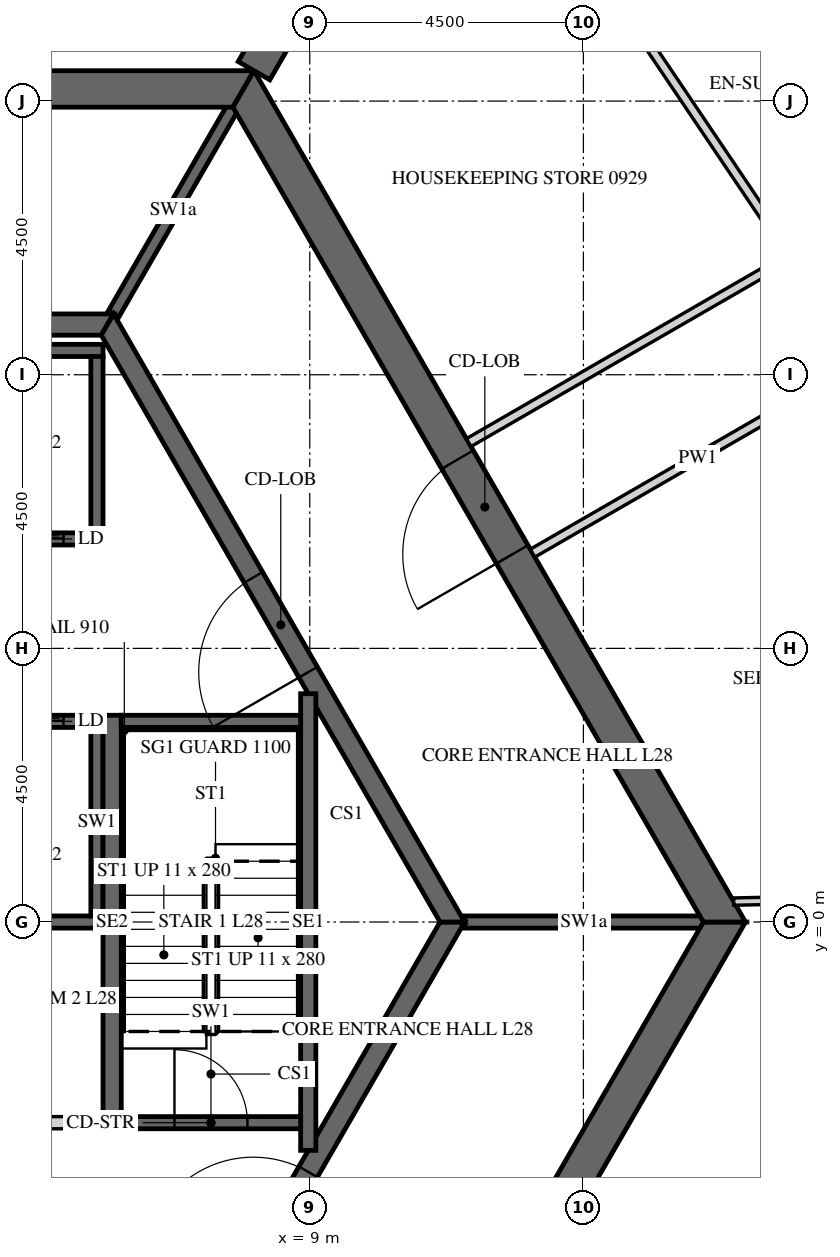
"""IFC4 building model, lengths in metres.
Left out: names, types, materials, properties, quantities, classifications, styles, units other than length and angle.
Written with IfcOpenShell. Run it as: python <this file> out.ifc"""

import sys

from ifc_helpers import new_model, si_unit, direction, frame, frame_2d, origin, place, context, subcontext, project, spatial, polyline, rectangle, outline, extrude, element, fill, save


model = new_model("IFC4")
c1 = context("Model", 3, precision=1e-05, world=origin(), true_north=direction((0.0, 1.0)))
c2 = subcontext(c1, "Body", "Model", "MODEL_VIEW")
j1 = project(units=[si_unit("LENGTHUNIT", "METRE"), si_unit("PLANEANGLEUNIT", "RADIAN")], contexts=[c1])
p1 = place(None, origin())
s1 = spatial("IfcSite", under=j1, at=p1, CompositionType="ELEMENT")
p2 = place(p1, origin())
s2 = spatial("IfcBuilding", under=s1, at=p2, CompositionType="ELEMENT")
p3 = place(p2, frame((0.0, 0.0, 123.3)))
s3 = spatial("IfcBuildingStorey", under=s2, at=p3, CompositionType="ELEMENT", Elevation=123.3)
p4 = place(p3, frame((7.91, -13.7, -0.15), z_axis=(0.0, 0.0, 1.0), x_axis=(0.499999880136, 0.866025472988, 0.0)))
e1 = element("IfcWall", 1, at=p4, inside=s3, PredefinedType="SHEAR", context=c2, shape_type="SweptSolid", body=[
    extrude(outline(polyline([(-0.173, -0.3), (15.993, -0.3), (15.646, 0.3), (0.173, 0.3), (-0.173, -0.3)])), origin(), (0.0, 0.0, 1.0), 3.9),
])
p5 = place(p4, frame((7.039, 0.0, 0.15)))
e2 = element("IfcOpeningElement", 2, at=p5, cuts=e1, PredefinedType="OPENING", context=c2, shape_type="SweptSolid", body=[
    extrude(rectangle(XDim=1.8, YDim=2.4, at=frame_2d((0.9, 1.2))), frame((0.0, 0.31, 0.0), z_axis=(0.0, -1.0, 0.0), x_axis=(1.0, 0.0, 0.0)), (0.0, 0.0, 1.0), 0.62),
])
p6 = place(p3, frame((15.819, 0.0, -0.15), z_axis=(0.0, 0.0, 1.0), x_axis=(-0.499999880136, 0.866025472988, 0.0)))
e3 = element("IfcWall", 3, at=p6, inside=s3, PredefinedType="SHEAR", context=c2, shape_type="SweptSolid", body=[
    extrude(outline(polyline([(-0.173, -0.3), (15.993, -0.3), (15.646, 0.3), (0.173, 0.3), (-0.173, -0.3)])), origin(), (0.0, 0.0, 1.0), 3.9),
])
p7 = place(p6, frame((6.981, 0.0, 0.15)))
e4 = element("IfcOpeningElement", 4, at=p7, cuts=e3, PredefinedType="OPENING", context=c2, shape_type="SweptSolid", body=[
    extrude(rectangle(XDim=1.8, YDim=2.4, at=frame_2d((0.9, 1.2))), frame((0.0, 0.31, 0.0), z_axis=(0.0, -1.0, 0.0), x_axis=(1.0, 0.0, 0.0)), (0.0, 0.0, 1.0), 0.62),
])
p8 = place(p3, frame((7.91, 13.7, -0.15), z_axis=(0.0, 0.0, 1.0), x_axis=(-1.0, 0.0, 0.0)))
e5 = element("IfcWall", 5, at=p8, inside=s3, PredefinedType="SHEAR", context=c2, shape_type="SweptSolid", body=[
    extrude(outline(polyline([(-0.173, -0.3), (15.993, -0.3), (15.646, 0.3), (0.173, 0.3), (-0.173, -0.3)])), origin(), (0.0, 0.0, 1.0), 3.9),
])
p9 = place(p8, frame((7.31, 0.0, 0.15)))
e6 = element("IfcOpeningElement", 6, at=p9, cuts=e5, PredefinedType="OPENING", context=c2, shape_type="SweptSolid", body=[
    extrude(rectangle(XDim=1.2, YDim=2.4, at=frame_2d((0.6, 1.2))), frame((0.0, 0.31, 0.0), z_axis=(0.0, -1.0, 0.0), x_axis=(1.0, 0.0, 0.0)), (0.0, 0.0, 1.0), 0.62),
])
p10 = place(p3, frame((8.083, 14.0, -0.15), z_axis=(0.0, 0.0, 1.0), x_axis=(0.499997680643, 0.866026742862, 0.0)))
e7 = element("IfcWall", 7, at=p10, inside=s3, PredefinedType="SHEAR", context=c2, shape_type="SweptSolid", body=[
    extrude(rectangle(XDim=16.509, YDim=0.6, at=frame_2d((8.254, 0.0))), origin(), (0.0, 0.0, 1.0), 3.9),
])
p11 = place(p10, frame((7.354, 0.0, 0.15)))
e8 = element("IfcOpeningElement", 8, at=p11, cuts=e7, PredefinedType="OPENING", context=c2, shape_type="SweptSolid", body=[
    extrude(rectangle(XDim=1.8, YDim=2.4, at=frame_2d((0.9, 1.2))), frame((0.0, 0.31, 0.0), z_axis=(0.0, -1.0, 0.0), x_axis=(1.0, 0.0, 0.0)), (0.0, 0.0, 1.0), 0.62),
])
p12 = place(p3, frame((5.673, -9.825, -0.15), z_axis=(0.0, 0.0, 1.0), x_axis=(0.499995046907, 0.866028263435, 0.0)))
e9 = element("IfcWall", 9, at=p12, inside=s3, PredefinedType="SHEAR", context=c2, shape_type="SweptSolid", body=[
    extrude(outline(polyline([(-0.101, -0.175), (11.446, -0.175), (11.244, 0.175), (0.101, 0.175), (-0.101, -0.175)])), origin(), (0.0, 0.0, 1.0), 3.9),
])
p13 = place(p12, frame((4.801, 0.0, 0.15)))
e10 = element("IfcOpeningElement", 10, at=p13, cuts=e9, PredefinedType="OPENING", context=c2, shape_type="SweptSolid", body=[
    extrude(rectangle(XDim=1.8, YDim=2.4, at=frame_2d((0.9, 1.2))), frame((0.0, 0.185, 0.0), z_axis=(0.0, -1.0, 0.0), x_axis=(1.0, 0.0, 0.0)), (0.0, 0.0, 1.0), 0.37),
])
p14 = place(p3, frame((11.345, 0.0, -0.15), z_axis=(0.0, 0.0, 1.0), x_axis=(-0.499995046907, 0.866028263435, 0.0)))
e11 = element("IfcWall", 11, at=p14, inside=s3, PredefinedType="SHEAR", context=c2, shape_type="SweptSolid", body=[
    extrude(outline(polyline([(-0.101, -0.175), (11.446, -0.175), (11.244, 0.175), (0.101, 0.175), (-0.101, -0.175)])), origin(), (0.0, 0.0, 1.0), 3.9),
])
p15 = place(p14, frame((4.744, 0.0, 0.15)))
e12 = element("IfcOpeningElement", 12, at=p15, cuts=e11, PredefinedType="OPENING", context=c2, shape_type="SweptSolid", body=[
    extrude(rectangle(XDim=1.8, YDim=2.4, at=frame_2d((0.9, 1.2))), frame((0.0, 0.185, 0.0), z_axis=(0.0, -1.0, 0.0), x_axis=(1.0, 0.0, 0.0)), (0.0, 0.0, 1.0), 0.37),
])
p16 = place(p3, frame((5.673, 9.825, -0.15), z_axis=(0.0, 0.0, 1.0), x_axis=(-1.0, 0.0, 0.0)))
e13 = element("IfcWall", 13, at=p16, inside=s3, PredefinedType="SHEAR", context=c2, shape_type="SweptSolid", body=[
    extrude(outline(polyline([(-0.101, -0.175), (11.446, -0.175), (11.244, 0.175), (0.101, 0.175), (-0.101, -0.175)])), origin(), (0.0, 0.0, 1.0), 3.9),
])
p17 = place(p3, frame((-5.6, 6.3, -0.25), z_axis=(0.0, 0.0, 1.0), x_axis=(1.0, 0.0, 0.0)))
e14 = element("IfcWall", 14, at=p17, inside=s3, PredefinedType="SHEAR", context=c2, shape_type="SweptSolid", body=[
    extrude(rectangle(XDim=11.2, YDim=0.2, at=frame_2d((5.6, 0.0))), origin(), (0.0, 0.0, 1.0), 3.9),
])
p18 = place(p17, frame((0.65, 0.0, 0.25)))
e15 = element("IfcOpeningElement", 15, at=p18, cuts=e14, PredefinedType="OPENING", context=c2, shape_type="SweptSolid", body=[
    extrude(rectangle(XDim=1.1, YDim=2.1, at=frame_2d((0.55, 1.05))), frame((0.0, 0.11, 0.0), z_axis=(0.0, -1.0, 0.0), x_axis=(1.0, 0.0, 0.0)), (0.0, 0.0, 1.0), 0.22),
])
p19 = place(p17, frame((2.85, 0.0, 0.25)))
e16 = element("IfcOpeningElement", 16, at=p19, cuts=e14, PredefinedType="OPENING", context=c2, shape_type="SweptSolid", body=[
    extrude(rectangle(XDim=1.1, YDim=2.1, at=frame_2d((0.55, 1.05))), frame((0.0, 0.11, 0.0), z_axis=(0.0, -1.0, 0.0), x_axis=(1.0, 0.0, 0.0)), (0.0, 0.0, 1.0), 0.22),
])
p20 = place(p17, frame((5.05, 0.0, 0.25)))
e17 = element("IfcOpeningElement", 17, at=p20, cuts=e14, PredefinedType="OPENING", context=c2, shape_type="SweptSolid", body=[
    extrude(rectangle(XDim=1.1, YDim=2.1, at=frame_2d((0.55, 1.05))), frame((0.0, 0.11, 0.0), z_axis=(0.0, -1.0, 0.0), x_axis=(1.0, 0.0, 0.0)), (0.0, 0.0, 1.0), 0.22),
])
p21 = place(p17, frame((7.25, 0.0, 0.25)))
e18 = element("IfcOpeningElement", 18, at=p21, cuts=e14, PredefinedType="OPENING", context=c2, shape_type="SweptSolid", body=[
    extrude(rectangle(XDim=1.1, YDim=2.1, at=frame_2d((0.55, 1.05))), frame((0.0, 0.11, 0.0), z_axis=(0.0, -1.0, 0.0), x_axis=(1.0, 0.0, 0.0)), (0.0, 0.0, 1.0), 0.22),
])
p22 = place(p17, frame((9.45, 0.0, 0.25)))
e19 = element("IfcOpeningElement", 19, at=p22, cuts=e14, PredefinedType="OPENING", context=c2, shape_type="SweptSolid", body=[
    extrude(rectangle(XDim=1.1, YDim=2.1, at=frame_2d((0.55, 1.05))), frame((0.0, 0.11, 0.0), z_axis=(0.0, -1.0, 0.0), x_axis=(1.0, 0.0, 0.0)), (0.0, 0.0, 1.0), 0.22),
])
p23 = place(p3, frame((-5.6, 9.4, -0.25), z_axis=(0.0, 0.0, 1.0), x_axis=(1.0, 0.0, 0.0)))
e20 = element("IfcWall", 20, at=p23, inside=s3, PredefinedType="SHEAR", context=c2, shape_type="SweptSolid", body=[
    extrude(rectangle(XDim=11.2, YDim=0.2, at=frame_2d((5.6, 0.0))), origin(), (0.0, 0.0, 1.0), 3.9),
])
p24 = place(p3, frame((5.5, 6.4, -0.25), z_axis=(0.0, 0.0, 1.0), x_axis=(0.0, 1.0, 0.0)))
e21 = element("IfcWall", 21, at=p24, inside=s3, PredefinedType="SHEAR", context=c2, shape_type="SweptSolid", body=[
    extrude(rectangle(XDim=2.9, YDim=0.2, at=frame_2d((1.45, 0.0))), origin(), (0.0, 0.0, 1.0), 3.9),
])
p25 = place(p3, frame((-5.6, 3.3, -0.25), z_axis=(0.0, 0.0, 1.0), x_axis=(1.0, 0.0, 0.0)))
e22 = element("IfcWall", 22, at=p25, inside=s3, PredefinedType="SHEAR", context=c2, shape_type="SweptSolid", body=[
    extrude(rectangle(XDim=11.2, YDim=0.2, at=frame_2d((5.6, 0.0))), origin(), (0.0, 0.0, 1.0), 3.9),
])
p26 = place(p25, frame((0.65, 0.0, 0.25)))
e23 = element("IfcOpeningElement", 23, at=p26, cuts=e22, PredefinedType="OPENING", context=c2, shape_type="SweptSolid", body=[
    extrude(rectangle(XDim=1.1, YDim=2.1, at=frame_2d((0.55, 1.05))), frame((0.0, 0.11, 0.0), z_axis=(0.0, -1.0, 0.0), x_axis=(1.0, 0.0, 0.0)), (0.0, 0.0, 1.0), 0.22),
])
p27 = place(p25, frame((2.85, 0.0, 0.25)))
e24 = element("IfcOpeningElement", 24, at=p27, cuts=e22, PredefinedType="OPENING", context=c2, shape_type="SweptSolid", body=[
    extrude(rectangle(XDim=1.1, YDim=2.1, at=frame_2d((0.55, 1.05))), frame((0.0, 0.11, 0.0), z_axis=(0.0, -1.0, 0.0), x_axis=(1.0, 0.0, 0.0)), (0.0, 0.0, 1.0), 0.22),
])
p28 = place(p25, frame((5.05, 0.0, 0.25)))
e25 = element("IfcOpeningElement", 25, at=p28, cuts=e22, PredefinedType="OPENING", context=c2, shape_type="SweptSolid", body=[
    extrude(rectangle(XDim=1.1, YDim=2.1, at=frame_2d((0.55, 1.05))), frame((0.0, 0.11, 0.0), z_axis=(0.0, -1.0, 0.0), x_axis=(1.0, 0.0, 0.0)), (0.0, 0.0, 1.0), 0.22),
])
p29 = place(p25, frame((7.25, 0.0, 0.25)))
e26 = element("IfcOpeningElement", 26, at=p29, cuts=e22, PredefinedType="OPENING", context=c2, shape_type="SweptSolid", body=[
    extrude(rectangle(XDim=1.1, YDim=2.1, at=frame_2d((0.55, 1.05))), frame((0.0, 0.11, 0.0), z_axis=(0.0, -1.0, 0.0), x_axis=(1.0, 0.0, 0.0)), (0.0, 0.0, 1.0), 0.22),
])
p30 = place(p25, frame((9.45, 0.0, 0.25)))
e27 = element("IfcOpeningElement", 27, at=p30, cuts=e22, PredefinedType="OPENING", context=c2, shape_type="SweptSolid", body=[
    extrude(rectangle(XDim=1.1, YDim=2.1, at=frame_2d((0.55, 1.05))), frame((0.0, 0.11, 0.0), z_axis=(0.0, -1.0, 0.0), x_axis=(1.0, 0.0, 0.0)), (0.0, 0.0, 1.0), 0.22),
])
p31 = place(p3, frame((-5.6, 0.0, -0.25), z_axis=(0.0, 0.0, 1.0), x_axis=(1.0, 0.0, 0.0)))
e28 = element("IfcWall", 28, at=p31, inside=s3, PredefinedType="SHEAR", context=c2, shape_type="SweptSolid", body=[
    extrude(rectangle(XDim=11.2, YDim=0.2, at=frame_2d((5.6, 0.0))), origin(), (0.0, 0.0, 1.0), 3.9),
])
p32 = place(p3, frame((5.5, 0.1, -0.25), z_axis=(0.0, 0.0, 1.0), x_axis=(0.0, 1.0, 0.0)))
e29 = element("IfcWall", 29, at=p32, inside=s3, PredefinedType="SHEAR", context=c2, shape_type="SweptSolid", body=[
    extrude(rectangle(XDim=3.1, YDim=0.2, at=frame_2d((1.55, 0.0))), origin(), (0.0, 0.0, 1.0), 3.9),
])
p33 = place(p3, frame((0.1, -3.3, 0.0), z_axis=(0.0, 0.0, 1.0), x_axis=(1.0, 0.0, 0.0)))
e30 = element("IfcWall", 30, at=p33, inside=s3, PredefinedType="PARTITIONING", context=c2, shape_type="SweptSolid", body=[
    extrude(rectangle(XDim=5.5, YDim=0.2, at=frame_2d((2.75, 0.0))), origin(), (0.0, 0.0, 1.0), 3.65),
])
p34 = place(p33, frame((2.3, 0.0, 0.0)))
e31 = element("IfcOpeningElement", 31, at=p34, cuts=e30, PredefinedType="OPENING", context=c2, shape_type="SweptSolid", body=[
    extrude(rectangle(XDim=0.9, YDim=2.1, at=frame_2d((0.45, 1.05))), frame((0.0, 0.11, 0.0), z_axis=(0.0, -1.0, 0.0), x_axis=(1.0, 0.0, 0.0)), (0.0, 0.0, 1.0), 0.22),
])
p35 = place(p3, frame((11.547, 0.0, -0.15), z_axis=(0.0, 0.0, 1.0), x_axis=(1.0, 0.0, 0.0)))
e32 = element("IfcWall", 32, at=p35, inside=s3, PredefinedType="SHEAR", context=c2, shape_type="SweptSolid", body=[
    extrude(rectangle(XDim=3.926, YDim=0.2, at=frame_2d((1.963, 0.0))), origin(), (0.0, 0.0, 1.0), 3.9),
])
p36 = place(p3, frame((5.773, 10.0, -0.15), z_axis=(0.0, 0.0, 1.0), x_axis=(0.500038251005, 0.86600331843, 0.0)))
e33 = element("IfcWall", 33, at=p36, inside=s3, PredefinedType="SHEAR", context=c2, shape_type="SweptSolid", body=[
    extrude(rectangle(XDim=3.926, YDim=0.2, at=frame_2d((1.963, 0.0))), origin(), (0.0, 0.0, 1.0), 3.9),
])
p37 = place(p3, frame((5.75, -3.4, -0.25), z_axis=(0.0, 0.0, 1.0), x_axis=(0.0, 1.0, 0.0)))
e34 = element("IfcWall", 34, at=p37, inside=s3, PredefinedType="SHEAR", context=c2, shape_type="SweptSolid", body=[
    extrude(rectangle(XDim=6.8, YDim=0.3, at=frame_2d((3.4, 0.0))), origin(), (0.0, 0.0, 1.0), 3.9),
])
p38 = place(p3, frame((8.975, -3.755, -0.25), z_axis=(0.0, 0.0, 1.0), x_axis=(0.0, 1.0, 0.0)))
e35 = element("IfcWall", 35, at=p38, inside=s3, PredefinedType="SHEAR", context=c2, shape_type="SweptSolid", body=[
    extrude(rectangle(XDim=7.51, YDim=0.25, at=frame_2d((3.755, 0.0))), origin(), (0.0, 0.0, 1.0), 3.9),
])
p39 = place(p3, frame((5.9, 3.3, -0.25), z_axis=(0.0, 0.0, 1.0), x_axis=(1.0, 0.0, 0.0)))
e36 = element("IfcWall", 36, at=p39, inside=s3, PredefinedType="SHEAR", context=c2, shape_type="SweptSolid", body=[
    extrude(rectangle(XDim=2.95, YDim=0.2, at=frame_2d((1.475, 0.0))), origin(), (0.0, 0.0, 1.0), 3.9),
])
p40 = place(p3, frame((5.9, -3.3, -0.25), z_axis=(0.0, 0.0, 1.0), x_axis=(1.0, 0.0, 0.0)))
e37 = element("IfcWall", 37, at=p40, inside=s3, PredefinedType="SHEAR", context=c2, shape_type="SweptSolid", body=[
    extrude(rectangle(XDim=2.95, YDim=0.2, at=frame_2d((1.475, 0.0))), origin(), (0.0, 0.0, 1.0), 3.9),
])
p41 = place(p40, frame((0.875, 0.0, 0.25)))
e38 = element("IfcOpeningElement", 38, at=p41, cuts=e37, PredefinedType="OPENING", context=c2, shape_type="SweptSolid", body=[
    extrude(rectangle(XDim=1.2, YDim=2.4, at=frame_2d((0.6, 1.2))), frame((0.0, 0.11, 0.0), z_axis=(0.0, -1.0, 0.0), x_axis=(1.0, 0.0, 0.0)), (0.0, 0.0, 1.0), 0.22),
])
p42 = place(p3, frame((13.928, -19.775, 0.0), z_axis=(0.0, 0.0, 1.0), x_axis=(0.50000450071, 0.866022805283, 0.0)))
e39 = element("IfcWall", 39, at=p42, inside=s3, PredefinedType="PARTITIONING", context=c2, shape_type="SweptSolid", body=[
    extrude(rectangle(XDim=23.877, YDim=0.15, at=frame_2d((11.938, 0.0))), origin(), (0.0, 0.0, 1.0), 2.988),
])
p43 = place(p42, frame((2.043, 0.0, 0.0)))
e40 = element("IfcOpeningElement", 40, at=p43, cuts=e39, PredefinedType="OPENING", context=c2, shape_type="SweptSolid", body=[
    extrude(rectangle(XDim=1.0, YDim=2.1, at=frame_2d((0.5, 1.05))), frame((0.0, 0.085, 0.0), z_axis=(0.0, -1.0, 0.0), x_axis=(1.0, 0.0, 0.0)), (0.0, 0.0, 1.0), 0.17),
])
p44 = place(p42, frame((13.272, 0.0, 0.0)))
e41 = element("IfcOpeningElement", 41, at=p44, cuts=e39, PredefinedType="OPENING", context=c2, shape_type="SweptSolid", body=[
    extrude(rectangle(XDim=1.0, YDim=2.1, at=frame_2d((0.5, 1.05))), frame((0.0, 0.085, 0.0), z_axis=(0.0, -1.0, 0.0), x_axis=(1.0, 0.0, 0.0)), (0.0, 0.0, 1.0), 0.17),
])
p45 = place(p3, frame((25.821, 0.972, 0.0), z_axis=(0.0, 0.0, 1.0), x_axis=(-0.559193816298, 0.829036956845, 0.0)))
e42 = element("IfcWall", 42, at=p45, inside=s3, PredefinedType="PARTITIONING", context=c2, shape_type="SweptSolid", body=[
    extrude(rectangle(XDim=22.002, YDim=0.15, at=frame_2d((11.001, 0.0))), origin(), (0.0, 0.0, 1.0), 2.988),
])
p46 = place(p45, frame((3.369, 0.0, 0.0)))
e43 = element("IfcOpeningElement", 43, at=p46, cuts=e42, PredefinedType="OPENING", context=c2, shape_type="SweptSolid", body=[
    extrude(rectangle(XDim=1.0, YDim=2.1, at=frame_2d((0.5, 1.05))), frame((0.0, 0.085, 0.0), z_axis=(0.0, -1.0, 0.0), x_axis=(1.0, 0.0, 0.0)), (0.0, 0.0, 1.0), 0.17),
])
p47 = place(p45, frame((10.721, 0.0, 0.0)))
e44 = element("IfcOpeningElement", 44, at=p47, cuts=e42, PredefinedType="OPENING", context=c2, shape_type="SweptSolid", body=[
    extrude(rectangle(XDim=1.0, YDim=2.1, at=frame_2d((0.5, 1.05))), frame((0.0, 0.085, 0.0), z_axis=(0.0, -1.0, 0.0), x_axis=(1.0, 0.0, 0.0)), (0.0, 0.0, 1.0), 0.17),
])
p48 = place(p45, frame((20.852, 0.0, 0.0)))
e45 = element("IfcOpeningElement", 45, at=p48, cuts=e42, PredefinedType="OPENING", context=c2, shape_type="SweptSolid", body=[
    extrude(rectangle(XDim=1.0, YDim=2.1, at=frame_2d((0.5, 1.05))), frame((0.0, 0.085, 0.0), z_axis=(0.0, -1.0, 0.0), x_axis=(1.0, 0.0, 0.0)), (0.0, 0.0, 1.0), 0.17),
])
p49 = place(p3, frame((12.664, 6.066, 0.0), z_axis=(0.0, 0.0, 1.0), x_axis=(0.866036561919, 0.499980673046, 0.0)))
e46 = element("IfcWall", 46, at=p49, inside=s3, PredefinedType="PARTITIONING", context=c2, shape_type="SweptSolid", body=[
    extrude(rectangle(XDim=6.275, YDim=0.15, at=frame_2d((3.137, 0.0))), origin(), (0.0, 0.0, 1.0), 2.988),
])
p50 = place(p3, frame((11.465, 19.037, 0.0), z_axis=(0.0, 0.0, 1.0), x_axis=(0.559196064773, -0.829035440221, 0.0)))
e47 = element("IfcWall", 47, at=p50, inside=s3, PredefinedType="PARTITIONING", context=c2, shape_type="SweptSolid", body=[
    extrude(rectangle(XDim=9.757, YDim=0.15, at=frame_2d((4.878, 0.0))), origin(), (0.0, 0.0, 1.0), 2.988),
])
p51 = place(p50, frame((4.428, 0.0, 0.0)))
e48 = element("IfcOpeningElement", 48, at=p51, cuts=e47, PredefinedType="OPENING", context=c2, shape_type="SweptSolid", body=[
    extrude(rectangle(XDim=0.9, YDim=2.1, at=frame_2d((0.45, 1.05))), frame((0.0, 0.085, 0.0), z_axis=(0.0, -1.0, 0.0), x_axis=(1.0, 0.0, 0.0)), (0.0, 0.0, 1.0), 0.17),
])
p52 = place(p3, frame((16.855, 10.911, 0.0), z_axis=(0.0, 0.0, 1.0), x_axis=(-0.866020343444, -0.500008764664, 0.0)))
e49 = element("IfcWall", 49, at=p52, inside=s3, PredefinedType="PARTITIONING", context=c2, shape_type="SweptSolid", body=[
    extrude(rectangle(XDim=6.053, YDim=0.15, at=frame_2d((3.026, 0.0))), origin(), (0.0, 0.0, 1.0), 2.988),
])
p53 = place(p3, frame((23.466, 0.493, 0.0), z_axis=(0.0, 0.0, 1.0), x_axis=(-0.999779281543, -0.021009240783, 0.0)))
e50 = element("IfcWall", 50, at=p53, inside=s3, PredefinedType="PARTITIONING", context=c2, shape_type="SweptSolid", body=[
    extrude(rectangle(XDim=7.495, YDim=0.12, at=frame_2d((3.748, 0.0))), origin(), (0.0, 0.0, 1.0), 2.988),
])
p54 = place(p7, origin())
e51 = element("IfcDoor", 51, at=p54, inside=s3, OperationType="DOUBLE_DOOR_SINGLE_SWING", PredefinedType="DOOR", context=c2, shape_type="SweptSolid", body=[
    extrude(rectangle(XDim=1.8, YDim=2.4, at=frame_2d((0.9, 1.2))), frame((0.0, 0.025, 0.0), z_axis=(0.0, -1.0, 0.0), x_axis=(1.0, 0.0, 0.0)), (0.0, 0.0, 1.0), 0.05),
])
fill(e4, e51)
p55 = place(p15, origin())
e52 = element("IfcDoor", 52, at=p55, inside=s3, OperationType="DOUBLE_DOOR_SINGLE_SWING", PredefinedType="DOOR", context=c2, shape_type="SweptSolid", body=[
    extrude(rectangle(XDim=1.8, YDim=2.4, at=frame_2d((0.9, 1.2))), frame((0.0, 0.025, 0.0), z_axis=(0.0, -1.0, 0.0), x_axis=(1.0, 0.0, 0.0)), (0.0, 0.0, 1.0), 0.05),
])
fill(e12, e52)
p56 = place(p13, origin())
e53 = element("IfcDoor", 53, at=p56, inside=s3, OperationType="DOUBLE_DOOR_SINGLE_SWING", PredefinedType="DOOR", context=c2, shape_type="SweptSolid", body=[
    extrude(rectangle(XDim=1.8, YDim=2.4, at=frame_2d((0.9, 1.2))), frame((0.0, 0.025, 0.0), z_axis=(0.0, -1.0, 0.0), x_axis=(1.0, 0.0, 0.0)), (0.0, 0.0, 1.0), 0.05),
])
fill(e10, e53)
p57 = place(p41, origin())
e54 = element("IfcDoor", 54, at=p57, inside=s3, OperationType="SINGLE_SWING_LEFT", PredefinedType="DOOR", context=c2, shape_type="SweptSolid", body=[
    extrude(rectangle(XDim=1.2, YDim=2.4, at=frame_2d((0.6, 1.2))), frame((0.0, 0.025, 0.0), z_axis=(0.0, -1.0, 0.0), x_axis=(1.0, 0.0, 0.0)), (0.0, 0.0, 1.0), 0.05),
])
fill(e38, e54)
p58 = place(p22, origin())
e55 = element("IfcDoor", 55, at=p58, inside=s3, OperationType="SLIDING_TO_LEFT", PredefinedType="DOOR", context=c2, shape_type="SweptSolid", body=[
    extrude(rectangle(XDim=1.1, YDim=2.1, at=frame_2d((0.55, 1.05))), frame((0.0, 0.025, 0.0), z_axis=(0.0, -1.0, 0.0), x_axis=(1.0, 0.0, 0.0)), (0.0, 0.0, 1.0), 0.05),
])
fill(e19, e55)
p59 = place(p30, origin())
e56 = element("IfcDoor", 56, at=p59, inside=s3, OperationType="SLIDING_TO_LEFT", PredefinedType="DOOR", context=c2, shape_type="SweptSolid", body=[
    extrude(rectangle(XDim=1.1, YDim=2.1, at=frame_2d((0.55, 1.05))), frame((0.0, 0.025, 0.0), z_axis=(0.0, -1.0, 0.0), x_axis=(1.0, 0.0, 0.0)), (0.0, 0.0, 1.0), 0.05),
])
fill(e27, e56)
save(model, sys.argv[1])
